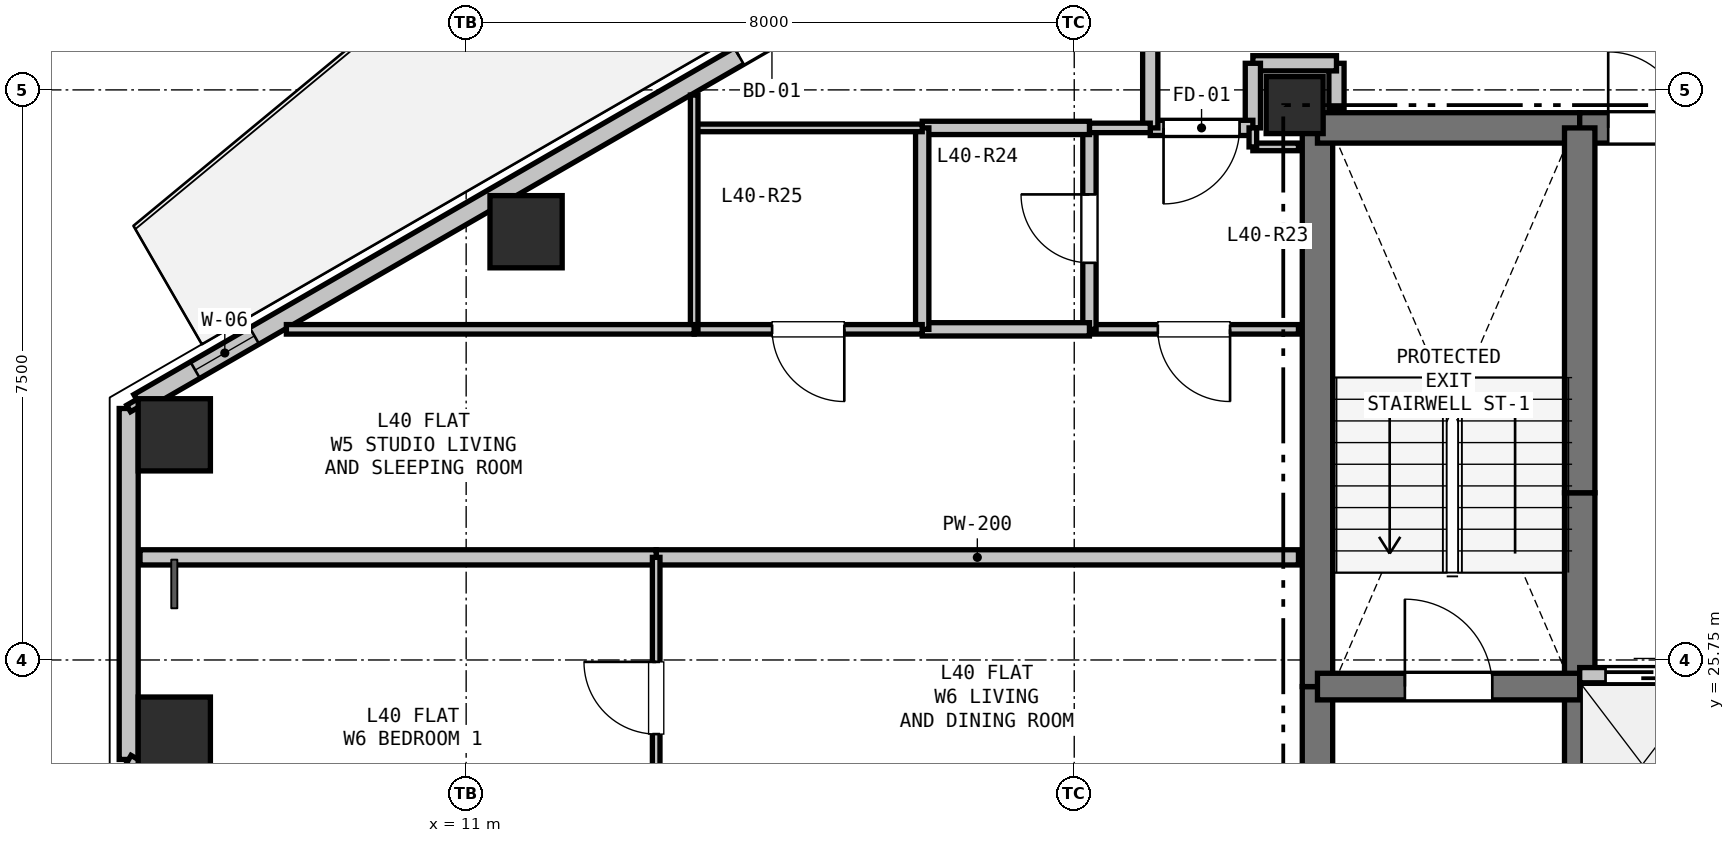
"""IFC4 building model, lengths in metres.
Left out: names, types, materials, properties, quantities, classifications, styles, units other than length and angle.
Written with IfcOpenShell. Run it as: python <this file> out.ifc"""

import sys

from ifc_helpers import new_model, si_unit, direction, frame, frame_2d, origin, origin_2d, place, context, subcontext, project, spatial, rectangle, hollow_rectangle, extrude, element, fill, save


model = new_model("IFC4")
c1 = context("Model", 3, precision=1e-05, world=origin(), true_north=direction((0.0, 1.0)))
c2 = subcontext(c1, "Body", "Model", "MODEL_VIEW")
j1 = project(units=[si_unit("LENGTHUNIT", "METRE"), si_unit("PLANEANGLEUNIT", "RADIAN")], contexts=[c1])
p1 = place(None, origin())
s1 = spatial("IfcSite", under=j1, at=p1, CompositionType="ELEMENT")
p2 = place(p1, origin())
s2 = spatial("IfcBuilding", under=s1, at=p2, CompositionType="ELEMENT")
p3 = place(p2, frame((0.0, 0.0, 144.3)))
s3 = spatial("IfcBuildingStorey", under=s2, at=p3, CompositionType="ELEMENT", Elevation=144.3)
p4 = place(p3, frame((21.9, 33.05, 0.0), z_axis=(0.0, 0.0, 1.0), x_axis=(1.0, 0.0, 0.0)))
e1 = element("IfcColumn", 1, at=p4, inside=s3, PredefinedType="COLUMN", context=c2, shape_type="SweptSolid", body=[
    extrude(rectangle(XDim=0.75, YDim=0.75, at=origin_2d()), origin(), (0.0, 0.0, 1.0), 3.3),
])
for number, where, z_axis, x_axis in (
    (2, (7.16, 28.712, 0.0), (0.0, 0.0, 1.0), (1.0, 0.0, 0.0)),
    (3, (11.788, 31.384, 0.0), (0.0, 0.0, 1.0), (1.0, 0.0, 0.0)),
    (4, (7.16, 24.788, 0.0), (0.0, 0.0, 1.0), (1.0, 0.0, 0.0)),
):
    element("IfcColumn", number, at=place(p3, frame(where, z_axis=z_axis, x_axis=x_axis)), inside=s3, PredefinedType="COLUMN", context=c2, shape_type="SweptSolid", body=[
        extrude(hollow_rectangle(XDim=0.95, YDim=0.95, WallThickness=0.028, at=origin_2d()), origin(), (0.0, 0.0, 1.0), 3.3),
    ])
p5 = place(p3, frame((6.56, 24.441, 0.0), z_axis=(0.0, 0.0, 1.0), x_axis=(0.0, 1.0, 0.0)))
e5 = element("IfcWall", 5, at=p5, inside=s3, PredefinedType="SOLIDWALL", context=c2, shape_type="SweptSolid", body=[
    extrude(rectangle(XDim=4.617, YDim=0.25, at=frame_2d((2.309, 0.0))), origin(), (0.0, 0.0, 1.0), 2.68),
])
p6 = place(p3, frame((6.69, 29.134, 0.0), z_axis=(0.0, 0.0, 1.0), x_axis=(0.866027848477, 0.499995765644, 0.0)))
e6 = element("IfcWall", 6, at=p6, inside=s3, PredefinedType="SOLIDWALL", context=c2, shape_type="SweptSolid", body=[
    extrude(rectangle(XDim=11.186, YDim=0.25, at=frame_2d((5.593, 0.0))), origin(), (0.0, 0.0, 1.0), 2.68),
])
p7 = place(p6, frame((9.122, 0.0, 0.0)))
e7 = element("IfcOpeningElement", 7, at=p7, cuts=e6, PredefinedType="OPENING", context=c2, shape_type="SweptSolid", body=[
    extrude(rectangle(XDim=1.0, YDim=2.1, at=frame_2d((0.5, 1.05))), frame((0.0, 0.135, 0.0), z_axis=(0.0, -1.0, 0.0), x_axis=(1.0, 0.0, 0.0)), (0.0, 0.0, 1.0), 0.27),
])
p8 = place(p6, frame((0.86, 0.0, 0.9)))
e8 = element("IfcOpeningElement", 8, at=p8, cuts=e6, PredefinedType="OPENING", context=c2, shape_type="SweptSolid", body=[
    extrude(rectangle(XDim=0.9, YDim=1.4, at=frame_2d((0.45, 0.7))), frame((0.0, 0.135, 0.0), z_axis=(0.0, -1.0, 0.0), x_axis=(1.0, 0.0, 0.0)), (0.0, 0.0, 1.0), 0.27),
])
p9 = place(p3, frame((16.378, 18.773, 0.0), z_axis=(0.0, 0.0, 1.0), x_axis=(-0.866027848477, 0.499995765644, 0.0)))
e9 = element("IfcWall", 9, at=p9, inside=s3, PredefinedType="SOLIDWALL", context=c2, shape_type="SweptSolid", body=[
    extrude(rectangle(XDim=11.186, YDim=0.25, at=frame_2d((5.593, 0.0))), origin(), (0.0, 0.0, 1.0), 2.68),
])
p10 = place(p9, frame((6.757, 0.0, 0.9)))
e10 = element("IfcOpeningElement", 10, at=p10, cuts=e9, PredefinedType="OPENING", context=c2, shape_type="SweptSolid", body=[
    extrude(rectangle(XDim=1.2, YDim=1.4, at=frame_2d((0.6, 0.7))), frame((0.0, 0.135, 0.0), z_axis=(0.0, -1.0, 0.0), x_axis=(1.0, 0.0, 0.0)), (0.0, 0.0, 1.0), 0.27),
])
p11 = place(p3, frame((22.2, 20.75, 0.0), z_axis=(0.0, 0.0, 1.0), x_axis=(0.0, 1.0, 0.0)))
e11 = element("IfcWall", 11, at=p11, inside=s3, PredefinedType="SHEAR", context=c2, shape_type="SweptSolid", body=[
    extrude(rectangle(XDim=4.65, YDim=0.4, at=frame_2d((2.325, 0.0))), origin(), (0.0, 0.0, 1.0), 3.06),
])
p12 = place(p3, frame((22.2, 25.4, 0.0), z_axis=(0.0, 0.0, 1.0), x_axis=(0.0, 1.0, 0.0)))
e12 = element("IfcWall", 12, at=p12, inside=s3, PredefinedType="SHEAR", context=c2, shape_type="SweptSolid", body=[
    extrude(rectangle(XDim=7.35, YDim=0.4, at=frame_2d((3.675, 0.0))), origin(), (0.0, 0.0, 1.0), 3.06),
])
p13 = place(p3, frame((22.2, 32.75, 0.0), z_axis=(0.0, 0.0, 1.0), x_axis=(1.0, 0.0, 0.0)))
e13 = element("IfcWall", 13, at=p13, inside=s3, PredefinedType="SHEAR", context=c2, shape_type="SweptSolid", body=[
    extrude(rectangle(XDim=3.45, YDim=0.4, at=frame_2d((1.725, 0.0))), origin(), (0.0, 0.0, 1.0), 3.06),
])
p14 = place(p3, frame((25.65, 32.75, 0.0), z_axis=(0.0, 0.0, 1.0), x_axis=(1.0, 0.0, 0.0)))
e14 = element("IfcWall", 14, at=p14, inside=s3, PredefinedType="SHEAR", context=c2, shape_type="SweptSolid", body=[
    extrude(rectangle(XDim=1.75, YDim=0.4, at=frame_2d((0.875, 0.0))), origin(), (0.0, 0.0, 1.0), 3.06),
])
p15 = place(p14, frame((0.375, 0.0, 0.0)))
e15 = element("IfcOpeningElement", 15, at=p15, cuts=e14, PredefinedType="OPENING", context=c2, shape_type="SweptSolid", body=[
    extrude(rectangle(XDim=1.0, YDim=2.15, at=frame_2d((0.5, 1.075))), frame((0.0, 0.21, 0.0), z_axis=(0.0, -1.0, 0.0), x_axis=(1.0, 0.0, 0.0)), (0.0, 0.0, 1.0), 0.42),
])
p16 = place(p3, frame((25.65, 22.75, 0.0), z_axis=(0.0, 0.0, 1.0), x_axis=(0.0, 1.0, 0.0)))
e16 = element("IfcWall", 16, at=p16, inside=s3, PredefinedType="SHEAR", context=c2, shape_type="SweptSolid", body=[
    extrude(rectangle(XDim=2.8, YDim=0.4, at=frame_2d((1.4, 0.0))), origin(), (0.0, 0.0, 1.0), 3.06),
])
p17 = place(p3, frame((25.65, 25.55, 0.0), z_axis=(0.0, 0.0, 1.0), x_axis=(0.0, 1.0, 0.0)))
e17 = element("IfcWall", 17, at=p17, inside=s3, PredefinedType="SHEAR", context=c2, shape_type="SweptSolid", body=[
    extrude(rectangle(XDim=2.4, YDim=0.4, at=frame_2d((1.2, 0.0))), origin(), (0.0, 0.0, 1.0), 3.06),
])
p18 = place(p3, frame((25.65, 27.95, 0.0), z_axis=(0.0, 0.0, 1.0), x_axis=(0.0, 1.0, 0.0)))
e18 = element("IfcWall", 18, at=p18, inside=s3, PredefinedType="SHEAR", context=c2, shape_type="SweptSolid", body=[
    extrude(rectangle(XDim=4.8, YDim=0.4, at=frame_2d((2.4, 0.0))), origin(), (0.0, 0.0, 1.0), 3.06),
])
p19 = place(p3, frame((22.2, 25.4, 0.0), z_axis=(0.0, 0.0, 1.0), x_axis=(1.0, 0.0, 0.0)))
e19 = element("IfcWall", 19, at=p19, inside=s3, PredefinedType="SHEAR", context=c2, shape_type="SweptSolid", body=[
    extrude(rectangle(XDim=3.45, YDim=0.35, at=frame_2d((1.725, 0.0))), origin(), (0.0, 0.0, 1.0), 3.06),
])
p20 = place(p19, frame((1.15, 0.0, 0.0)))
e20 = element("IfcOpeningElement", 20, at=p20, cuts=e19, PredefinedType="OPENING", context=c2, shape_type="SweptSolid", body=[
    extrude(rectangle(XDim=1.15, YDim=2.15, at=frame_2d((0.575, 1.075))), frame((0.0, 0.185, 0.0), z_axis=(0.0, -1.0, 0.0), x_axis=(1.0, 0.0, 0.0)), (0.0, 0.0, 1.0), 0.37),
])
p21 = place(p3, frame((25.65, 25.55, 0.0), z_axis=(0.0, 0.0, 1.0), x_axis=(1.0, 0.0, 0.0)))
e21 = element("IfcWall", 21, at=p21, inside=s3, PredefinedType="PARTITIONING", context=c2, shape_type="SweptSolid", body=[
    extrude(rectangle(XDim=4.95, YDim=0.2, at=frame_2d((2.475, 0.0))), origin(), (0.0, 0.0, 1.0), 3.06),
])
p22 = place(p21, frame((0.34, 0.0, 0.0)))
e22 = element("IfcOpeningElement", 22, at=p22, cuts=e21, PredefinedType="OPENING", context=c2, shape_type="SweptSolid", body=[
    extrude(rectangle(XDim=1.1, YDim=2.15, at=frame_2d((0.55, 1.075))), frame((0.0, 0.11, 0.0), z_axis=(0.0, -1.0, 0.0), x_axis=(1.0, 0.0, 0.0)), (0.0, 0.0, 1.0), 0.22),
])
p23 = place(p21, frame((1.99, 0.0, 0.0)))
e23 = element("IfcOpeningElement", 23, at=p23, cuts=e21, PredefinedType="OPENING", context=c2, shape_type="SweptSolid", body=[
    extrude(rectangle(XDim=1.1, YDim=2.15, at=frame_2d((0.55, 1.075))), frame((0.0, 0.11, 0.0), z_axis=(0.0, -1.0, 0.0), x_axis=(1.0, 0.0, 0.0)), (0.0, 0.0, 1.0), 0.22),
])
p24 = place(p21, frame((3.64, 0.0, 0.0)))
e24 = element("IfcOpeningElement", 24, at=p24, cuts=e21, PredefinedType="OPENING", context=c2, shape_type="SweptSolid", body=[
    extrude(rectangle(XDim=1.1, YDim=2.15, at=frame_2d((0.55, 1.075))), frame((0.0, 0.11, 0.0), z_axis=(0.0, -1.0, 0.0), x_axis=(1.0, 0.0, 0.0)), (0.0, 0.0, 1.0), 0.22),
])
p25 = place(p3, frame((22.45, 33.0, 0.0), z_axis=(0.0, 0.0, 1.0), x_axis=(0.0, 1.0, 0.0)))
e25 = element("IfcWall", 25, at=p25, inside=s3, PredefinedType="PARTITIONING", context=c2, shape_type="SweptSolid", body=[
    extrude(rectangle(XDim=0.6, YDim=0.2, at=frame_2d((0.3, 0.0))), origin(), (0.0, 0.0, 1.0), 2.585),
])
p26 = place(p3, frame((22.45, 33.6, 0.0), z_axis=(0.0, 0.0, 1.0), x_axis=(-1.0, 0.0, 0.0)))
e26 = element("IfcWall", 26, at=p26, inside=s3, PredefinedType="PARTITIONING", context=c2, shape_type="SweptSolid", body=[
    extrude(rectangle(XDim=1.1, YDim=0.2, at=frame_2d((0.55, 0.0))), origin(), (0.0, 0.0, 1.0), 3.06),
])
p27 = place(p3, frame((21.35, 33.6, 0.0), z_axis=(0.0, 0.0, 1.0), x_axis=(0.0, -1.0, 0.0)))
e27 = element("IfcWall", 27, at=p27, inside=s3, PredefinedType="PARTITIONING", context=c2, shape_type="SweptSolid", body=[
    extrude(rectangle(XDim=0.85, YDim=0.2, at=frame_2d((0.425, 0.0))), origin(), (0.0, 0.0, 1.0), 2.433),
])
p28 = place(p3, frame((21.35, 32.75, 0.0), z_axis=(0.0, 0.0, 1.0), x_axis=(-1.0, 0.0, 0.0)))
e28 = element("IfcWall", 28, at=p28, inside=s3, PredefinedType="PARTITIONING", context=c2, shape_type="SweptSolid", body=[
    extrude(rectangle(XDim=1.35, YDim=0.2, at=frame_2d((0.675, 0.0))), origin(), (0.0, 0.0, 1.0), 2.433),
])
p29 = place(p28, frame((0.175, 0.0, 0.0)))
e29 = element("IfcOpeningElement", 29, at=p29, cuts=e28, PredefinedType="OPENING", context=c2, shape_type="SweptSolid", body=[
    extrude(rectangle(XDim=1.0, YDim=2.15, at=frame_2d((0.5, 1.075))), frame((0.0, 0.11, 0.0), z_axis=(0.0, -1.0, 0.0), x_axis=(1.0, 0.0, 0.0)), (0.0, 0.0, 1.0), 0.22),
])
p30 = place(p3, frame((20.0, 32.75, 0.0), z_axis=(0.0, 0.0, 1.0), x_axis=(0.0, 1.0, 0.0)))
e30 = element("IfcWall", 30, at=p30, inside=s3, PredefinedType="PARTITIONING", context=c2, shape_type="SweptSolid", body=[
    extrude(rectangle(XDim=2.6, YDim=0.2, at=frame_2d((1.3, 0.0))), origin(), (0.0, 0.0, 1.0), 2.433),
])
p31 = place(p3, frame((21.35, 32.5, 0.0), z_axis=(0.0, 0.0, 1.0), x_axis=(1.0, 0.0, 0.0)))
e31 = element("IfcWall", 31, at=p31, inside=s3, PredefinedType="PARTITIONING", context=c2, shape_type="SweptSolid", body=[
    extrude(rectangle(XDim=0.6, YDim=0.1, at=frame_2d((0.3, 0.0))), origin(), (0.0, 0.0, 1.0), 2.585),
])
p32 = place(p3, frame((21.95, 30.1, 0.0), z_axis=(0.0, 0.0, 1.0), x_axis=(-1.0, 0.0, 0.0)))
e32 = element("IfcWall", 32, at=p32, inside=s3, PredefinedType="PARTITIONING", context=c2, shape_type="SweptSolid", body=[
    extrude(rectangle(XDim=2.75, YDim=0.125, at=frame_2d((1.375, 0.0))), origin(), (0.0, 0.0, 1.0), 2.585),
])
p33 = place(p32, frame((0.9, 0.0, 0.0)))
e33 = element("IfcOpeningElement", 33, at=p33, cuts=e32, PredefinedType="OPENING", context=c2, shape_type="SweptSolid", body=[
    extrude(rectangle(XDim=0.95, YDim=2.1, at=frame_2d((0.475, 1.05))), frame((0.0, 0.073, 0.0), z_axis=(0.0, -1.0, 0.0), x_axis=(1.0, 0.0, 0.0)), (0.0, 0.0, 1.0), 0.145),
])
p34 = place(p3, frame((19.2, 30.1, 0.0), z_axis=(0.0, 0.0, 1.0), x_axis=(0.0, 1.0, 0.0)))
e34 = element("IfcWall", 34, at=p34, inside=s3, PredefinedType="PLUMBINGWALL", context=c2, shape_type="SweptSolid", body=[
    extrude(rectangle(XDim=2.65, YDim=0.175, at=frame_2d((1.325, 0.0))), origin(), (0.0, 0.0, 1.0), 2.433),
])
p35 = place(p34, frame((0.875, 0.0, 0.0)))
e35 = element("IfcOpeningElement", 35, at=p35, cuts=e34, PredefinedType="OPENING", context=c2, shape_type="SweptSolid", body=[
    extrude(rectangle(XDim=0.9, YDim=2.1, at=frame_2d((0.45, 1.05))), frame((0.0, 0.097, 0.0), z_axis=(0.0, -1.0, 0.0), x_axis=(1.0, 0.0, 0.0)), (0.0, 0.0, 1.0), 0.195),
])
p36 = place(p3, frame((19.2, 32.75, 0.0), z_axis=(0.0, 0.0, 1.0), x_axis=(1.0, 0.0, 0.0)))
e36 = element("IfcWall", 36, at=p36, inside=s3, PredefinedType="PARTITIONING", context=c2, shape_type="SweptSolid", body=[
    extrude(rectangle(XDim=0.8, YDim=0.125, at=frame_2d((0.4, 0.0))), origin(), (0.0, 0.0, 1.0), 2.433),
])
p37 = place(p3, frame((21.35, 32.75, 0.0), z_axis=(0.0, 0.0, 1.0), x_axis=(0.0, -1.0, 0.0)))
e37 = element("IfcWall", 37, at=p37, inside=s3, PredefinedType="PARTITIONING", context=c2, shape_type="SweptSolid", body=[
    extrude(rectangle(XDim=0.25, YDim=0.1, at=frame_2d((0.125, 0.0))), origin(), (0.0, 0.0, 1.0), 3.06),
])
p38 = place(p3, frame((17.0, 32.75, 0.0), z_axis=(0.0, 0.0, 1.0), x_axis=(1.0, 0.0, 0.0)))
e38 = element("IfcWall", 38, at=p38, inside=s3, PredefinedType="PLUMBINGWALL", context=c2, shape_type="SweptSolid", body=[
    extrude(rectangle(XDim=2.2, YDim=0.175, at=frame_2d((1.1, 0.0))), origin(), (0.0, 0.0, 1.0), 2.433),
])
p39 = place(p3, frame((19.2, 30.1, 0.0), z_axis=(0.0, 0.0, 1.0), x_axis=(-1.0, 0.0, 0.0)))
e39 = element("IfcWall", 39, at=p39, inside=s3, PredefinedType="PLUMBINGWALL", context=c2, shape_type="SweptSolid", body=[
    extrude(rectangle(XDim=2.2, YDim=0.175, at=frame_2d((1.1, 0.0))), origin(), (0.0, 0.0, 1.0), 3.06),
])
p40 = place(p3, frame((17.0, 30.1, 0.0), z_axis=(0.0, 0.0, 1.0), x_axis=(0.0, 1.0, 0.0)))
e40 = element("IfcWall", 40, at=p40, inside=s3, PredefinedType="PLUMBINGWALL", context=c2, shape_type="SweptSolid", body=[
    extrude(rectangle(XDim=2.65, YDim=0.175, at=frame_2d((1.325, 0.0))), origin(), (0.0, 0.0, 1.0), 2.433),
])
p41 = place(p3, frame((14.0, 32.75, 0.0), z_axis=(0.0, 0.0, 1.0), x_axis=(1.0, 0.0, 0.0)))
e41 = element("IfcWall", 41, at=p41, inside=s3, PredefinedType="PARTITIONING", context=c2, shape_type="SweptSolid", body=[
    extrude(rectangle(XDim=3.0, YDim=0.1, at=frame_2d((1.5, 0.0))), origin(), (0.0, 0.0, 1.0), 2.365),
])
p42 = place(p3, frame((17.0, 30.1, 0.0), z_axis=(0.0, 0.0, 1.0), x_axis=(-1.0, 0.0, 0.0)))
e42 = element("IfcWall", 42, at=p42, inside=s3, PredefinedType="PARTITIONING", context=c2, shape_type="SweptSolid", body=[
    extrude(rectangle(XDim=3.0, YDim=0.125, at=frame_2d((1.5, 0.0))), origin(), (0.0, 0.0, 1.0), 3.06),
])
p43 = place(p42, frame((1.025, 0.0, 0.0)))
e43 = element("IfcOpeningElement", 43, at=p43, cuts=e42, PredefinedType="OPENING", context=c2, shape_type="SweptSolid", body=[
    extrude(rectangle(XDim=0.95, YDim=2.1, at=frame_2d((0.475, 1.05))), frame((0.0, 0.073, 0.0), z_axis=(0.0, -1.0, 0.0), x_axis=(1.0, 0.0, 0.0)), (0.0, 0.0, 1.0), 0.145),
])
p44 = place(p3, frame((14.0, 30.1, 0.0), z_axis=(0.0, 0.0, 1.0), x_axis=(0.0, 1.0, 0.0)))
e44 = element("IfcWall", 44, at=p44, inside=s3, PredefinedType="PARTITIONING", context=c2, shape_type="SweptSolid", body=[
    extrude(rectangle(XDim=3.082, YDim=0.1, at=frame_2d((1.541, 0.0))), origin(), (0.0, 0.0, 1.0), 2.365),
])
p45 = place(p3, frame((8.635, 30.1, 0.0), z_axis=(0.0, 0.0, 1.0), x_axis=(1.0, 0.0, 0.0)))
e45 = element("IfcWall", 45, at=p45, inside=s3, PredefinedType="PARTITIONING", context=c2, shape_type="SweptSolid", body=[
    extrude(rectangle(XDim=5.365, YDim=0.125, at=frame_2d((2.683, 0.0))), origin(), (0.0, 0.0, 1.0), 2.724),
])
p46 = place(p3, frame((21.95, 27.1, 0.0), z_axis=(0.0, 0.0, 1.0), x_axis=(-1.0, 0.0, 0.0)))
e46 = element("IfcWall", 46, at=p46, inside=s3, PredefinedType="PARTITIONING", context=c2, shape_type="SweptSolid", body=[
    extrude(rectangle(XDim=8.45, YDim=0.2, at=frame_2d((4.225, 0.0))), origin(), (0.0, 0.0, 1.0), 2.585),
])
p47 = place(p3, frame((13.5, 27.1, 0.0), z_axis=(0.0, 0.0, 1.0), x_axis=(-1.0, 0.0, 0.0)))
e47 = element("IfcWall", 47, at=p47, inside=s3, PredefinedType="PARTITIONING", context=c2, shape_type="SweptSolid", body=[
    extrude(rectangle(XDim=6.791, YDim=0.2, at=frame_2d((3.396, 0.0))), origin(), (0.0, 0.0, 1.0), 2.724),
])
p48 = place(p3, frame((6.56, 29.059, 0.0), z_axis=(0.0, 0.0, 1.0), x_axis=(0.866131372301, 0.499816412211, 0.0)))
e48 = element("IfcWall", 48, at=p48, inside=s3, PredefinedType="PARTITIONING", context=c2, shape_type="SweptSolid", body=[
    extrude(rectangle(XDim=0.15, YDim=0.1, at=frame_2d((0.075, 0.0))), origin(), (0.0, 0.0, 1.0), 3.06),
])
p49 = place(p3, frame((13.5, 23.4, 0.0), z_axis=(0.0, 0.0, 1.0), x_axis=(0.0, 1.0, 0.0)))
e49 = element("IfcWall", 49, at=p49, inside=s3, PredefinedType="PARTITIONING", context=c2, shape_type="SweptSolid", body=[
    extrude(rectangle(XDim=3.7, YDim=0.1, at=frame_2d((1.85, 0.0))), origin(), (0.0, 0.0, 1.0), 3.06),
])
p50 = place(p49, frame((1.375, 0.0, 0.0)))
e50 = element("IfcOpeningElement", 50, at=p50, cuts=e49, PredefinedType="OPENING", context=c2, shape_type="SweptSolid", body=[
    extrude(rectangle(XDim=0.95, YDim=2.1, at=frame_2d((0.475, 1.05))), frame((0.0, 0.06, 0.0), z_axis=(0.0, -1.0, 0.0), x_axis=(1.0, 0.0, 0.0)), (0.0, 0.0, 1.0), 0.12),
])
p51 = place(p3, frame((6.69, 24.366, 0.0), z_axis=(0.0, 0.0, 1.0), x_axis=(-0.866131372301, 0.499816412211, 0.0)))
e51 = element("IfcWall", 51, at=p51, inside=s3, PredefinedType="PARTITIONING", context=c2, shape_type="SweptSolid", body=[
    extrude(rectangle(XDim=0.15, YDim=0.125, at=frame_2d((0.075, 0.0))), origin(), (0.0, 0.0, 1.0), 3.06),
])
p52 = place(p7, origin())
e52 = element("IfcDoor", 52, at=p52, inside=s3, OperationType="SINGLE_SWING_LEFT", PredefinedType="DOOR", context=c2, shape_type="SweptSolid", body=[
    extrude(rectangle(XDim=1.0, YDim=2.1, at=frame_2d((0.5, 1.05))), frame((0.0, 0.025, 0.0), z_axis=(0.0, -1.0, 0.0), x_axis=(1.0, 0.0, 0.0)), (0.0, 0.0, 1.0), 0.05),
])
fill(e7, e52)
p53 = place(p8, origin())
e53 = element("IfcWindow", 53, at=p53, inside=s3, PartitioningType="SINGLE_PANEL", PredefinedType="WINDOW", context=c2, shape_type="SweptSolid", body=[
    extrude(rectangle(XDim=0.9, YDim=1.4, at=frame_2d((0.45, 0.7))), frame((0.0, 0.03, 0.0), z_axis=(0.0, -1.0, 0.0), x_axis=(1.0, 0.0, 0.0)), (0.0, 0.0, 1.0), 0.06),
])
fill(e8, e53)
p54 = place(p22, origin())
e54 = element("IfcDoor", 54, at=p54, inside=s3, OperationType="SLIDING_TO_LEFT", PredefinedType="DOOR", context=c2, shape_type="SweptSolid", body=[
    extrude(rectangle(XDim=1.1, YDim=2.15, at=frame_2d((0.55, 1.075))), frame((0.0, 0.025, 0.0), z_axis=(0.0, -1.0, 0.0), x_axis=(1.0, 0.0, 0.0)), (0.0, 0.0, 1.0), 0.05),
])
fill(e22, e54)
p55 = place(p15, origin())
e55 = element("IfcDoor", 55, at=p55, inside=s3, OperationType="SINGLE_SWING_LEFT", PredefinedType="DOOR", context=c2, shape_type="SweptSolid", body=[
    extrude(rectangle(XDim=1.0, YDim=2.15, at=frame_2d((0.5, 1.075))), frame((0.0, 0.025, 0.0), z_axis=(0.0, -1.0, 0.0), x_axis=(1.0, 0.0, 0.0)), (0.0, 0.0, 1.0), 0.05),
])
fill(e15, e55)
p56 = place(p20, origin())
e56 = element("IfcDoor", 56, at=p56, inside=s3, OperationType="SINGLE_SWING_LEFT", PredefinedType="DOOR", context=c2, shape_type="SweptSolid", body=[
    extrude(rectangle(XDim=1.15, YDim=2.15, at=frame_2d((0.575, 1.075))), frame((0.0, 0.025, 0.0), z_axis=(0.0, -1.0, 0.0), x_axis=(1.0, 0.0, 0.0)), (0.0, 0.0, 1.0), 0.05),
])
fill(e20, e56)
p57 = place(p29, origin())
e57 = element("IfcDoor", 57, at=p57, inside=s3, OperationType="SINGLE_SWING_RIGHT", PredefinedType="DOOR", context=c2, shape_type="SweptSolid", body=[
    extrude(rectangle(XDim=1.0, YDim=2.15, at=frame_2d((0.5, 1.075))), frame((0.0, 0.025, 0.0), z_axis=(0.0, -1.0, 0.0), x_axis=(1.0, 0.0, 0.0)), (0.0, 0.0, 1.0), 0.05),
])
fill(e29, e57)
p58 = place(p35, origin())
e58 = element("IfcDoor", 58, at=p58, inside=s3, OperationType="SINGLE_SWING_RIGHT", PredefinedType="DOOR", context=c2, shape_type="SweptSolid", body=[
    extrude(rectangle(XDim=0.9, YDim=2.1, at=frame_2d((0.45, 1.05))), frame((0.0, 0.025, 0.0), z_axis=(0.0, -1.0, 0.0), x_axis=(1.0, 0.0, 0.0)), (0.0, 0.0, 1.0), 0.05),
])
fill(e35, e58)
p59 = place(p33, origin())
e59 = element("IfcDoor", 59, at=p59, inside=s3, OperationType="SINGLE_SWING_LEFT", PredefinedType="DOOR", context=c2, shape_type="SweptSolid", body=[
    extrude(rectangle(XDim=0.95, YDim=2.1, at=frame_2d((0.475, 1.05))), frame((0.0, 0.025, 0.0), z_axis=(0.0, -1.0, 0.0), x_axis=(1.0, 0.0, 0.0)), (0.0, 0.0, 1.0), 0.05),
])
fill(e33, e59)
p60 = place(p43, origin())
e60 = element("IfcDoor", 60, at=p60, inside=s3, OperationType="SINGLE_SWING_LEFT", PredefinedType="DOOR", context=c2, shape_type="SweptSolid", body=[
    extrude(rectangle(XDim=0.95, YDim=2.1, at=frame_2d((0.475, 1.05))), frame((0.0, 0.025, 0.0), z_axis=(0.0, -1.0, 0.0), x_axis=(1.0, 0.0, 0.0)), (0.0, 0.0, 1.0), 0.05),
])
fill(e43, e60)
p61 = place(p50, origin())
e61 = element("IfcDoor", 61, at=p61, inside=s3, OperationType="SINGLE_SWING_RIGHT", PredefinedType="DOOR", context=c2, shape_type="SweptSolid", body=[
    extrude(rectangle(XDim=0.95, YDim=2.1, at=frame_2d((0.475, 1.05))), frame((0.0, 0.025, 0.0), z_axis=(0.0, -1.0, 0.0), x_axis=(1.0, 0.0, 0.0)), (0.0, 0.0, 1.0), 0.05),
])
fill(e50, e61)
save(model, sys.argv[1])
